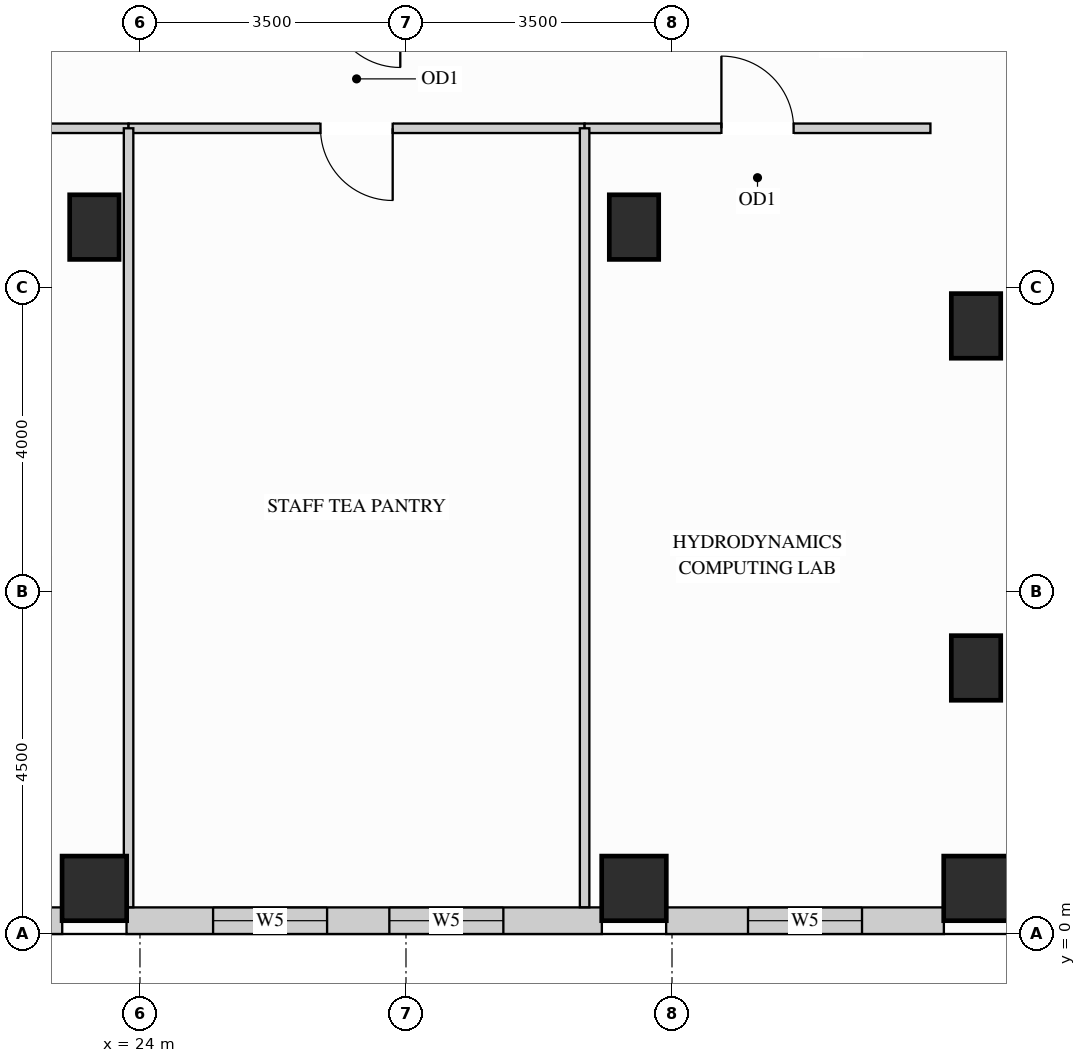
"""IFC4 building model, lengths in metres.
Left out: names, types, materials, properties, quantities, classifications, styles, units other than length and angle.
Written with IfcOpenShell. Run it as: python <this file> out.ifc"""

import sys

from ifc_helpers import new_model, si_unit, direction, frame, frame_2d, origin, origin_2d, place, context, subcontext, project, spatial, rectangle, extrude, source, transform, mapped, element, fill, save


model = new_model("IFC4")
c1 = context("Model", 3, precision=1e-05, world=origin(), true_north=direction((0.0, 1.0)))
c2 = subcontext(c1, "Body", "Model", "MODEL_VIEW")
j1 = project(units=[si_unit("LENGTHUNIT", "METRE"), si_unit("PLANEANGLEUNIT", "RADIAN")], contexts=[c1])
p1 = place(None, origin())
s1 = spatial("IfcSite", under=j1, at=p1, CompositionType="ELEMENT")
p2 = place(p1, origin())
s2 = spatial("IfcBuilding", under=s1, at=p2, CompositionType="ELEMENT")
p3 = place(p2, frame((0.0, 0.0, 252.0)))
s3 = spatial("IfcBuildingStorey", under=s2, at=p3, CompositionType="ELEMENT", Elevation=252.0)
m1 = source(origin(), c2, "Body", "SweptSolid", [
    extrude(rectangle(XDim=0.65, YDim=0.85, at=origin_2d()), origin(), (0.0, 0.0, 1.0), 3.4),
])
for number, where, z_axis, x_axis in (
    (1, (35.0, 3.5, 0.0), (0.0, 0.0, 1.0), (1.0, 0.0, 0.0)),
    (2, (35.0, 8.0, 0.0), (0.0, 0.0, 1.0), (1.0, 0.0, 0.0)),
    (3, (23.4, 9.3, 0.0), (0.0, 0.0, 1.0), (1.0, 0.0, 0.0)),
    (4, (30.5, 9.3, 0.0), (0.0, 0.0, 1.0), (1.0, 0.0, 0.0)),
):
    element("IfcColumn", number, at=place(p3, frame(where, z_axis=z_axis, x_axis=x_axis)), inside=s3, PredefinedType="COLUMN", context=c2, shape_type="MappedRepresentation", body=[
        mapped(m1, transform((0.0, 0.0, 0.0), x_axis=(1.0, 0.0, 0.0), y_axis=(0.0, 1.0, 0.0), z_axis=(0.0, 0.0, 1.0))),
    ])
m2 = source(origin(), c2, "Body", "SweptSolid", [
    extrude(rectangle(XDim=0.85, YDim=0.85, at=origin_2d()), origin(), (0.0, 0.0, 1.0), 3.4),
])
for number, where, z_axis, x_axis in (
    (5, (23.4, 0.6, 0.0), (0.0, 0.0, 1.0), (1.0, 0.0, 0.0)),
    (6, (30.5, 0.6, 0.0), (0.0, 0.0, 1.0), (1.0, 0.0, 0.0)),
    (7, (35.0, 0.6, 0.0), (0.0, 0.0, 1.0), (1.0, 0.0, 0.0)),
):
    element("IfcColumn", number, at=place(p3, frame(where, z_axis=z_axis, x_axis=x_axis)), inside=s3, PredefinedType="COLUMN", context=c2, shape_type="MappedRepresentation", body=[
        mapped(m2, transform((0.0, 0.0, 0.0), x_axis=(1.0, 0.0, 0.0), y_axis=(0.0, 1.0, 0.0), z_axis=(0.0, 0.0, 1.0))),
    ])
p4 = place(p3, frame((19.423, 0.175, 0.0), z_axis=(0.0, 0.0, 1.0), x_axis=(1.0, 0.0, 0.0)))
e8 = element("IfcWall", 8, at=p4, inside=s3, PredefinedType="SOLIDWALL", context=c2, shape_type="SweptSolid", body=[
    extrude(rectangle(XDim=3.554, YDim=0.35, at=frame_2d((1.777, 0.0))), origin(), (0.0, 0.0, 1.0), 3.385),
])
p5 = place(p4, frame((1.027, 0.0, 0.78)))
e9 = element("IfcOpeningElement", 9, at=p5, cuts=e8, PredefinedType="OPENING", context=c2, shape_type="SweptSolid", body=[
    extrude(rectangle(XDim=1.5, YDim=2.0, at=frame_2d((0.75, 1.0))), frame((0.0, 0.185, 0.0), z_axis=(0.0, -1.0, 0.0), x_axis=(1.0, 0.0, 0.0)), (0.0, 0.0, 1.0), 0.37),
])
p6 = place(p3, frame((23.823, 0.175, 0.0), z_axis=(0.0, 0.0, 1.0), x_axis=(1.0, 0.0, 0.0)))
e10 = element("IfcWall", 10, at=p6, inside=s3, PredefinedType="SOLIDWALL", context=c2, shape_type="SweptSolid", body=[
    extrude(rectangle(XDim=6.254, YDim=0.35, at=frame_2d((3.127, 0.0))), origin(), (0.0, 0.0, 1.0), 3.385),
])
p7 = place(p6, frame((1.139, 0.0, 0.78)))
e11 = element("IfcOpeningElement", 11, at=p7, cuts=e10, PredefinedType="OPENING", context=c2, shape_type="SweptSolid", body=[
    extrude(rectangle(XDim=1.5, YDim=2.0, at=frame_2d((0.75, 1.0))), frame((0.0, 0.185, 0.0), z_axis=(0.0, -1.0, 0.0), x_axis=(1.0, 0.0, 0.0)), (0.0, 0.0, 1.0), 0.37),
])
p8 = place(p6, frame((3.458, 0.0, 0.78)))
e12 = element("IfcOpeningElement", 12, at=p8, cuts=e10, PredefinedType="OPENING", context=c2, shape_type="SweptSolid", body=[
    extrude(rectangle(XDim=1.5, YDim=2.0, at=frame_2d((0.75, 1.0))), frame((0.0, 0.185, 0.0), z_axis=(0.0, -1.0, 0.0), x_axis=(1.0, 0.0, 0.0)), (0.0, 0.0, 1.0), 0.37),
])
p9 = place(p3, frame((30.923, 0.175, 0.0), z_axis=(0.0, 0.0, 1.0), x_axis=(1.0, 0.0, 0.0)))
e13 = element("IfcWall", 13, at=p9, inside=s3, PredefinedType="SOLIDWALL", context=c2, shape_type="SweptSolid", body=[
    extrude(rectangle(XDim=3.654, YDim=0.35, at=frame_2d((1.827, 0.0))), origin(), (0.0, 0.0, 1.0), 3.385),
])
p10 = place(p9, frame((1.077, 0.0, 0.78)))
e14 = element("IfcOpeningElement", 14, at=p10, cuts=e13, PredefinedType="OPENING", context=c2, shape_type="SweptSolid", body=[
    extrude(rectangle(XDim=1.5, YDim=2.0, at=frame_2d((0.75, 1.0))), frame((0.0, 0.185, 0.0), z_axis=(0.0, -1.0, 0.0), x_axis=(1.0, 0.0, 0.0)), (0.0, 0.0, 1.0), 0.37),
])
p11 = place(p3, frame((19.5, 10.6, 0.0), z_axis=(0.0, 0.0, 1.0), x_axis=(1.0, 0.0, 0.0)))
e15 = element("IfcWall", 15, at=p11, inside=s3, PredefinedType="PARTITIONING", context=c2, shape_type="SweptSolid", body=[
    extrude(rectangle(XDim=4.35, YDim=0.125, at=frame_2d((2.175, 0.0))), origin(), (0.0, 0.0, 1.0), 3.385),
])
p12 = place(p11, frame((1.7, 0.0, 0.0)))
e16 = element("IfcOpeningElement", 16, at=p12, cuts=e15, PredefinedType="OPENING", context=c2, shape_type="SweptSolid", body=[
    extrude(rectangle(XDim=0.95, YDim=2.15, at=frame_2d((0.475, 1.075))), frame((0.0, 0.073, 0.0), z_axis=(0.0, -1.0, 0.0), x_axis=(1.0, 0.0, 0.0)), (0.0, 0.0, 1.0), 0.145),
])
p13 = place(p3, frame((23.85, 10.6, 0.0), z_axis=(0.0, 0.0, 1.0), x_axis=(1.0, 0.0, 0.0)))
e17 = element("IfcWall", 17, at=p13, inside=s3, PredefinedType="PARTITIONING", context=c2, shape_type="SweptSolid", body=[
    extrude(rectangle(XDim=6.0, YDim=0.125, at=frame_2d((3.0, 0.0))), origin(), (0.0, 0.0, 1.0), 3.385),
])
p14 = place(p13, frame((2.525, 0.0, 0.0)))
e18 = element("IfcOpeningElement", 18, at=p14, cuts=e17, PredefinedType="OPENING", context=c2, shape_type="SweptSolid", body=[
    extrude(rectangle(XDim=0.95, YDim=2.15, at=frame_2d((0.475, 1.075))), frame((0.0, 0.073, 0.0), z_axis=(0.0, -1.0, 0.0), x_axis=(1.0, 0.0, 0.0)), (0.0, 0.0, 1.0), 0.145),
])
p15 = place(p3, frame((29.85, 10.6, 0.0), z_axis=(0.0, 0.0, 1.0), x_axis=(1.0, 0.0, 0.0)))
e19 = element("IfcWall", 19, at=p15, inside=s3, PredefinedType="PARTITIONING", context=c2, shape_type="SweptSolid", body=[
    extrude(rectangle(XDim=4.55, YDim=0.125, at=frame_2d((2.275, 0.0))), origin(), (0.0, 0.0, 1.0), 3.385),
])
p16 = place(p15, frame((1.8, 0.0, 0.0)))
e20 = element("IfcOpeningElement", 20, at=p16, cuts=e19, PredefinedType="OPENING", context=c2, shape_type="SweptSolid", body=[
    extrude(rectangle(XDim=0.95, YDim=2.15, at=frame_2d((0.475, 1.075))), frame((0.0, 0.073, 0.0), z_axis=(0.0, -1.0, 0.0), x_axis=(1.0, 0.0, 0.0)), (0.0, 0.0, 1.0), 0.145),
])
m3 = source(origin(), c2, "Body", "SweptSolid", [
    extrude(rectangle(XDim=10.248, YDim=0.125, at=frame_2d((5.124, 0.0))), origin(), (0.0, 0.0, 1.0), 3.385),
])
for number, where, z_axis, x_axis in (
    (21, (23.85, 0.352, 0.0), (0.0, 0.0, 1.0), (0.0, 1.0, 0.0)),
    (22, (29.85, 0.352, 0.0), (0.0, 0.0, 1.0), (0.0, 1.0, 0.0)),
):
    element("IfcWall", number, at=place(p3, frame(where, z_axis=z_axis, x_axis=x_axis)), inside=s3, PredefinedType="PARTITIONING", context=c2, shape_type="MappedRepresentation", body=[
        mapped(m3, transform((0.0, 0.0, 0.0), x_axis=(1.0, 0.0, 0.0), y_axis=(0.0, 1.0, 0.0), z_axis=(0.0, 0.0, 1.0))),
    ])
m4 = source(origin(), c2, "Body", "SweptSolid", [
    extrude(rectangle(XDim=0.95, YDim=2.15, at=frame_2d((0.475, 1.075))), frame((0.0, 0.025, 0.0), z_axis=(0.0, -1.0, 0.0), x_axis=(1.0, 0.0, 0.0)), (0.0, 0.0, 1.0), 0.05),
])
p17 = place(p14, origin())
e23 = element("IfcDoor", 23, at=p17, inside=s3, OperationType="SINGLE_SWING_RIGHT", PredefinedType="DOOR", context=c2, shape_type="MappedRepresentation", body=[
    mapped(m4, transform((0.0, 0.0, 0.0), x_axis=(1.0, 0.0, 0.0), y_axis=(0.0, 1.0, 0.0), z_axis=(0.0, 0.0, 1.0))),
])
fill(e18, e23)
p18 = place(p16, origin())
e24 = element("IfcDoor", 24, at=p18, inside=s3, OperationType="SINGLE_SWING_LEFT", PredefinedType="DOOR", context=c2, shape_type="MappedRepresentation", body=[
    mapped(m4, transform((0.0, 0.0, 0.0), x_axis=(1.0, 0.0, 0.0), y_axis=(0.0, 1.0, 0.0), z_axis=(0.0, 0.0, 1.0))),
])
fill(e20, e24)
m5 = source(origin(), c2, "Body", "SweptSolid", [
    extrude(rectangle(XDim=1.5, YDim=2.0, at=frame_2d((0.75, 1.0))), frame((0.0, 0.03, 0.0), z_axis=(0.0, -1.0, 0.0), x_axis=(1.0, 0.0, 0.0)), (0.0, 0.0, 1.0), 0.06),
])
p19 = place(p7, origin())
e25 = element("IfcWindow", 25, at=p19, inside=s3, PartitioningType="SINGLE_PANEL", PredefinedType="WINDOW", context=c2, shape_type="MappedRepresentation", body=[
    mapped(m5, transform((0.0, 0.0, 0.0), x_axis=(1.0, 0.0, 0.0), y_axis=(0.0, 1.0, 0.0), z_axis=(0.0, 0.0, 1.0))),
])
fill(e11, e25)
p20 = place(p8, origin())
e26 = element("IfcWindow", 26, at=p20, inside=s3, PartitioningType="SINGLE_PANEL", PredefinedType="WINDOW", context=c2, shape_type="MappedRepresentation", body=[
    mapped(m5, transform((0.0, 0.0, 0.0), x_axis=(1.0, 0.0, 0.0), y_axis=(0.0, 1.0, 0.0), z_axis=(0.0, 0.0, 1.0))),
])
fill(e12, e26)
p21 = place(p10, origin())
e27 = element("IfcWindow", 27, at=p21, inside=s3, PartitioningType="SINGLE_PANEL", PredefinedType="WINDOW", context=c2, shape_type="MappedRepresentation", body=[
    mapped(m5, transform((0.0, 0.0, 0.0), x_axis=(1.0, 0.0, 0.0), y_axis=(0.0, 1.0, 0.0), z_axis=(0.0, 0.0, 1.0))),
])
fill(e14, e27)
save(model, sys.argv[1])
